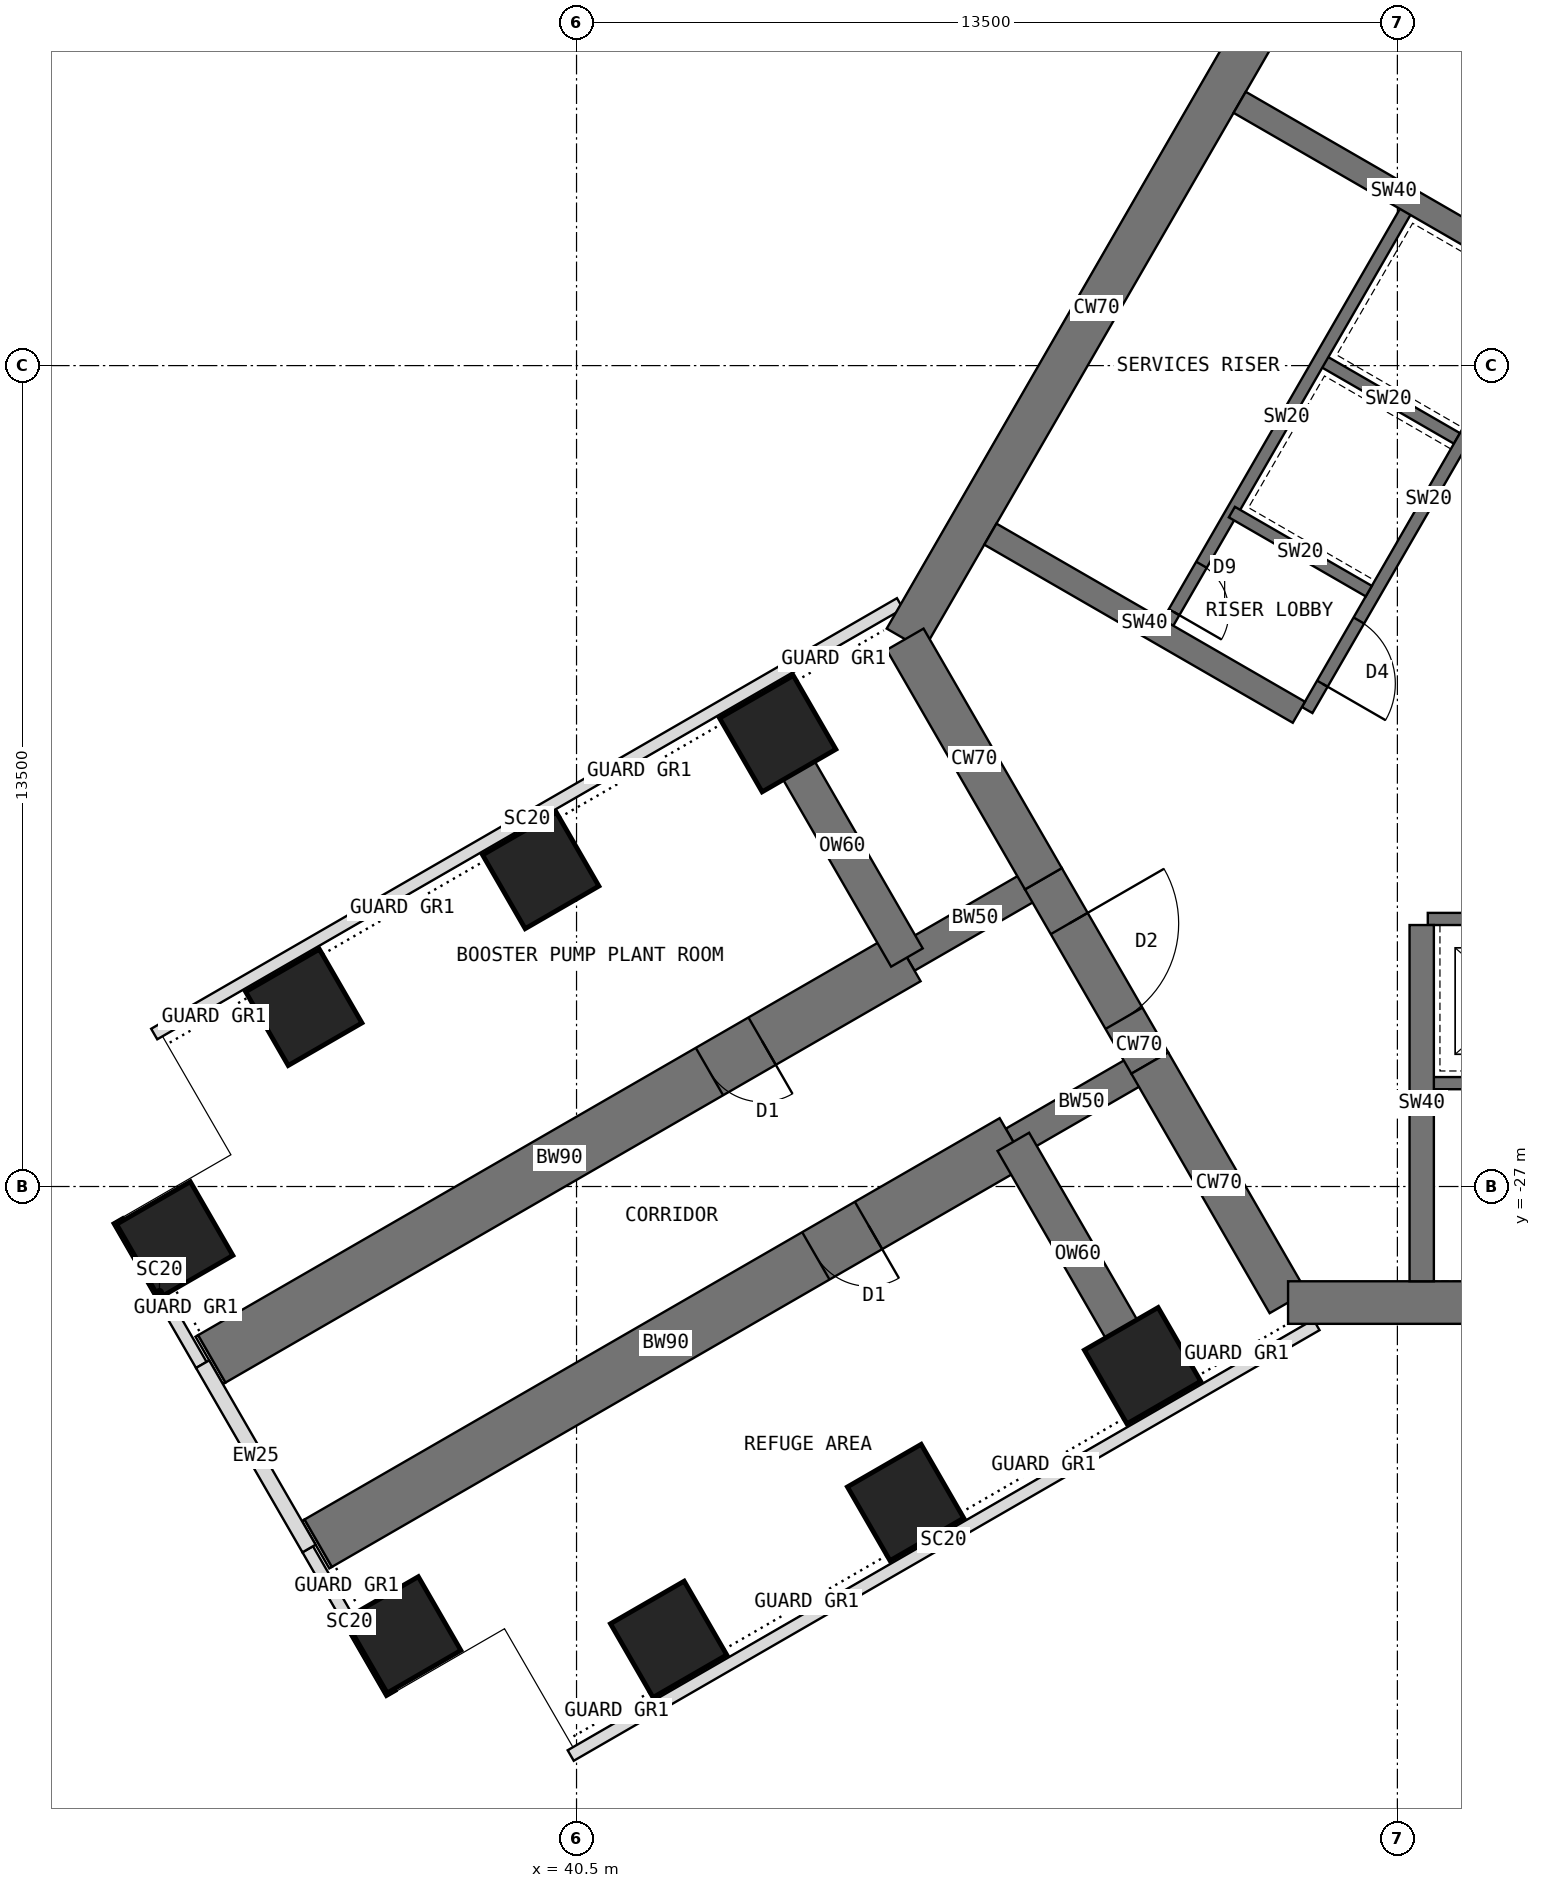
"""IFC4 building model, lengths in metres.
Left out: names, types, materials, properties, quantities, classifications, styles, units other than length and angle.
Written with IfcOpenShell. Run it as: python <this file> out.ifc"""

import sys

from ifc_helpers import new_model, si_unit, direction, frame, frame_2d, origin, origin_2d, place, context, subcontext, project, spatial, rectangle, extrude, element, fill, save


model = new_model("IFC4")
c1 = context("Model", 3, precision=1e-05, world=origin(), true_north=direction((0.0, 1.0)))
c2 = subcontext(c1, "Body", "Model", "MODEL_VIEW")
j1 = project(units=[si_unit("LENGTHUNIT", "METRE"), si_unit("PLANEANGLEUNIT", "RADIAN")], contexts=[c1])
p1 = place(None, origin())
s1 = spatial("IfcSite", under=j1, at=p1, CompositionType="ELEMENT")
p2 = place(p1, origin())
s2 = spatial("IfcBuilding", under=s1, at=p2, CompositionType="ELEMENT")
p3 = place(p2, frame((0.0, 0.0, 92.5)))
s3 = spatial("IfcBuildingStorey", under=s2, at=p3, CompositionType="ELEMENT", Elevation=92.5)
p4 = place(p3, frame((52.202, -7.092, 0.0), z_axis=(0.0, 0.0, 1.0), x_axis=(-0.500005998175, -0.866021940709, 0.0)))
e1 = element("IfcWall", 1, at=p4, inside=s3, PredefinedType="SHEAR", context=c2, shape_type="SweptSolid", body=[
    extrude(rectangle(XDim=12.596, YDim=0.7, at=frame_2d((6.298, 0.0))), origin(), (0.0, 0.0, 1.0), 5.0),
])
p5 = place(p3, frame((45.904, -18.0, 0.0), z_axis=(0.0, 0.0, 1.0), x_axis=(0.500024481964, -0.866011268655, 0.0)))
e2 = element("IfcWall", 2, at=p5, inside=s3, PredefinedType="SHEAR", context=c2, shape_type="SweptSolid", body=[
    extrude(rectangle(XDim=4.548, YDim=0.7, at=frame_2d((2.274, 0.0))), origin(), (0.0, 0.0, 1.0), 5.0),
])
p6 = place(p3, frame((48.178, -21.939, 0.0), z_axis=(0.0, 0.0, 1.0), x_axis=(0.500010275428, -0.866019471182, 0.0)))
e3 = element("IfcWall", 3, at=p6, inside=s3, PredefinedType="SHEAR", context=c2, shape_type="SweptSolid", body=[
    extrude(rectangle(XDim=3.5, YDim=0.7, at=frame_2d((1.75, 0.0))), origin(), (0.0, 0.0, 1.0), 5.0),
])
p7 = place(p6, frame((0.85, 0.0, 0.0)))
e4 = element("IfcOpeningElement", 4, at=p7, cuts=e3, PredefinedType="OPENING", context=c2, shape_type="SweptSolid", body=[
    extrude(rectangle(XDim=1.8, YDim=2.1, at=frame_2d((0.9, 1.05))), frame((0.0, 0.36, 0.0), z_axis=(0.0, -1.0, 0.0), x_axis=(1.0, 0.0, 0.0)), (0.0, 0.0, 1.0), 0.72),
])
p8 = place(p3, frame((49.928, -24.97, 0.0), z_axis=(0.0, 0.0, 1.0), x_axis=(0.499984222037, -0.866034513004, 0.0)))
e5 = element("IfcWall", 5, at=p8, inside=s3, PredefinedType="SHEAR", context=c2, shape_type="SweptSolid", body=[
    extrude(rectangle(XDim=4.548, YDim=0.7, at=frame_2d((2.274, 0.0))), origin(), (0.0, 0.0, 1.0), 5.0),
])
p9 = place(p3, frame((52.202, -28.908, 0.0), z_axis=(0.0, 0.0, 1.0), x_axis=(1.0, 0.0, 0.0)))
e6 = element("IfcWall", 6, at=p9, inside=s3, PredefinedType="SHEAR", context=c2, shape_type="SweptSolid", body=[
    extrude(rectangle(XDim=12.596, YDim=0.7, at=frame_2d((6.298, 0.0))), origin(), (0.0, 0.0, 1.0), 5.0),
])
p10 = place(p3, frame((49.928, -24.97, 0.0), z_axis=(0.0, 0.0, 1.0), x_axis=(-0.866031863473, -0.499988811324, 0.0)))
e7 = element("IfcWall", 7, at=p10, inside=s3, PredefinedType="SHEAR", context=c2, shape_type="SweptSolid", body=[
    extrude(rectangle(XDim=2.592, YDim=0.5, at=frame_2d((1.296, 0.0))), origin(), (0.0, 0.0, 1.0), 5.0),
])
p11 = place(p3, frame((47.684, -26.266, 0.0), z_axis=(0.0, 0.0, 1.0), x_axis=(-0.866027579429, -0.499996231654, 0.0)))
e8 = element("IfcWall", 8, at=p11, inside=s3, PredefinedType="SHEAR", context=c2, shape_type="SweptSolid", body=[
    extrude(rectangle(XDim=13.2, YDim=0.9, at=frame_2d((6.6, 0.0))), origin(), (0.0, 0.0, 1.0), 5.0),
])
p12 = place(p11, frame((2.75, 0.0, 0.0)))
e9 = element("IfcOpeningElement", 9, at=p12, cuts=e8, PredefinedType="OPENING", context=c2, shape_type="SweptSolid", body=[
    extrude(rectangle(XDim=1.0, YDim=2.1, at=frame_2d((0.5, 1.05))), frame((0.0, 0.46, 0.0), z_axis=(0.0, -1.0, 0.0), x_axis=(1.0, 0.0, 0.0)), (0.0, 0.0, 1.0), 0.92),
])
p13 = place(p3, frame((48.178, -21.939, 0.0), z_axis=(0.0, 0.0, 1.0), x_axis=(-0.866072649678, -0.499918158782, 0.0)))
e10 = element("IfcWall", 10, at=p13, inside=s3, PredefinedType="SHEAR", context=c2, shape_type="SweptSolid", body=[
    extrude(rectangle(XDim=2.592, YDim=0.5, at=frame_2d((1.296, 0.0))), origin(), (0.0, 0.0, 1.0), 5.0),
])
p14 = place(p3, frame((45.934, -23.234, 0.0), z_axis=(0.0, 0.0, 1.0), x_axis=(-0.866019570528, -0.500010103361, 0.0)))
e11 = element("IfcWall", 11, at=p14, inside=s3, PredefinedType="SHEAR", context=c2, shape_type="SweptSolid", body=[
    extrude(rectangle(XDim=13.2, YDim=0.9, at=frame_2d((6.6, 0.0))), origin(), (0.0, 0.0, 1.0), 5.0),
])
p15 = place(p14, frame((2.75, 0.0, 0.0)))
e12 = element("IfcOpeningElement", 12, at=p15, cuts=e11, PredefinedType="OPENING", context=c2, shape_type="SweptSolid", body=[
    extrude(rectangle(XDim=1.0, YDim=2.1, at=frame_2d((0.5, 1.05))), frame((0.0, 0.46, 0.0), z_axis=(0.0, -1.0, 0.0), x_axis=(1.0, 0.0, 0.0)), (0.0, 0.0, 1.0), 0.92),
])
for number, where, z_axis, x_axis in (
    (13, (49.809, -29.946, 0.0), (0.0, 0.0, 1.0), (0.866, 0.5, 0.0)),
    (14, (43.809, -19.554, 0.0), (0.0, 0.0, 1.0), (0.866, 0.5, 0.0)),
    (15, (45.912, -32.196, 0.0), (0.0, 0.0, 1.0), (0.866, 0.5, 0.0)),
    (16, (39.912, -21.804, 0.0), (0.0, 0.0, 1.0), (0.866, 0.5, 0.0)),
    (17, (42.014, -34.446, 0.0), (0.0, 0.0, 1.0), (0.866, 0.5, 0.0)),
    (18, (36.014, -24.054, 0.0), (0.0, 0.0, 1.0), (0.866, 0.5, 0.0)),
    (19, (37.642, -34.373, 0.0), (0.0, 0.0, 1.0), (0.866, 0.5, 0.0)),
    (20, (33.892, -27.877, 0.0), (0.0, 0.0, 1.0), (0.866, 0.5, 0.0)),
):
    element("IfcColumn", number, at=place(p3, frame(where, z_axis=z_axis, x_axis=x_axis)), inside=s3, PredefinedType="COLUMN", context=c2, shape_type="SweptSolid", body=[
        extrude(rectangle(XDim=1.4, YDim=1.4, at=origin_2d()), origin(), (0.0, 0.0, 1.0), 5.0),
    ])
for number, where, z_axis, x_axis in (
    (21, (47.684, -26.266, 0.0), (0.0, 0.0, 1.0), (0.5, -0.866, 0.0)),
    (22, (45.934, -23.234, 0.0), (0.0, 0.0, 1.0), (-0.5, 0.866, 0.0)),
):
    element("IfcWall", number, at=place(p3, frame(where, z_axis=z_axis, x_axis=x_axis)), inside=s3, PredefinedType="SHEAR", context=c2, shape_type="SweptSolid", body=[
        extrude(rectangle(XDim=4.25, YDim=0.6, at=frame_2d((2.125, 0.0))), origin(), (0.0, 0.0, 1.0), 5.0),
    ])
for number, where, z_axis, x_axis in (
    (23, (52.67, -29.276, 0.0), (0.0, 0.0, 1.0), (-0.866, -0.5, 0.0)),
    (24, (33.554, -24.493, 0.0), (0.0, 0.0, 1.0), (0.866, 0.5, 0.0)),
):
    element("IfcWall", number, at=place(p3, frame(where, z_axis=z_axis, x_axis=x_axis)), inside=s3, PredefinedType="USERDEFINED", context=c2, shape_type="SweptSolid", body=[
        extrude(rectangle(XDim=14.163, YDim=0.2, at=frame_2d((7.082, 0.0))), origin(), (0.0, 0.0, 1.0), 4.8),
    ])
p16 = place(p3, frame((32.954, -27.553, 0.0), z_axis=(0.0, 0.0, 1.0), x_axis=(0.499996545922, -0.866027397988, 0.0)))
e25 = element("IfcWall", 25, at=p16, inside=s3, PredefinedType="USERDEFINED", context=c2, shape_type="SweptSolid", body=[
    extrude(rectangle(XDim=2.75, YDim=0.2, at=frame_2d((1.375, 0.0))), origin(), (0.0, 0.0, 1.0), 4.8),
])
p17 = place(p3, frame((34.351, -29.922, 0.0), z_axis=(0.0, 0.0, 1.0), x_axis=(0.499980071345, -0.866036909293, 0.0)))
e26 = element("IfcWall", 26, at=p17, inside=s3, PredefinedType="STANDARD", context=c2, shape_type="SweptSolid", body=[
    extrude(rectangle(XDim=3.5, YDim=0.25, at=frame_2d((1.75, 0.0))), origin(), (0.0, 0.0, 1.0), 4.8),
])
p18 = place(p3, frame((36.079, -32.966, 0.0), z_axis=(0.0, 0.0, 1.0), x_axis=(0.499996545922, -0.866027397988, 0.0)))
e27 = element("IfcWall", 27, at=p18, inside=s3, PredefinedType="USERDEFINED", context=c2, shape_type="SweptSolid", body=[
    extrude(rectangle(XDim=2.75, YDim=0.2, at=frame_2d((1.375, 0.0))), origin(), (0.0, 0.0, 1.0), 4.8),
])
p19 = place(p3, frame((36.252, -32.865, 0.0), z_axis=(0.0, 0.0, 1.0), x_axis=(-0.86553723574, -0.500844580232, 0.0)))
e28 = element("IfcWall", 28, at=p19, inside=s3, PredefinedType="PARTITIONING", context=c2, shape_type="SweptSolid", body=[
    extrude(rectangle(XDim=0.05, YDim=0.9, at=frame_2d((0.025, 0.0))), origin(), (0.0, 0.0, 1.0), 4.8),
])
p20 = place(p3, frame((34.502, -29.834, 0.0), z_axis=(0.0, 0.0, 1.0), x_axis=(-0.867642581652, -0.497188445666, 0.0)))
e29 = element("IfcWall", 29, at=p20, inside=s3, PredefinedType="PARTITIONING", context=c2, shape_type="SweptSolid", body=[
    extrude(rectangle(XDim=0.05, YDim=0.9, at=frame_2d((0.025, 0.0))), origin(), (0.0, 0.0, 1.0), 4.8),
])
p21 = place(p3, frame((56.516, -12.236, 0.0), z_axis=(0.0, 0.0, 1.0), x_axis=(-0.49999894854, -0.866026010844, 0.0)))
e30 = element("IfcWall", 30, at=p21, inside=s3, PredefinedType="SHEAR", context=c2, shape_type="SweptSolid", body=[
    extrude(rectangle(XDim=8.0, YDim=0.2, at=frame_2d((4.0, 0.0))), origin(), (0.0, 0.0, 1.0), 5.0),
])
p22 = place(p21, frame((6.3, 0.0, 0.0)))
e31 = element("IfcOpeningElement", 31, at=p22, cuts=e30, PredefinedType="OPENING", context=c2, shape_type="SweptSolid", body=[
    extrude(rectangle(XDim=1.2, YDim=2.1, at=frame_2d((0.6, 1.05))), frame((0.0, 0.11, 0.0), z_axis=(0.0, -1.0, 0.0), x_axis=(1.0, 0.0, 0.0)), (0.0, 0.0, 1.0), 0.22),
])
for number, where, z_axis, x_axis in (
    (32, (54.98, -14.697, 0.0), (0.0, 0.0, 1.0), (-0.866, 0.5, 0.0)),
    (33, (53.53, -17.209, 0.0), (0.0, 0.0, 1.0), (-0.866, 0.5, 0.0)),
):
    element("IfcWall", number, at=place(p3, frame(where, z_axis=z_axis, x_axis=x_axis)), inside=s3, PredefinedType="SHEAR", context=c2, shape_type="SweptSolid", body=[
        extrude(rectangle(XDim=2.6, YDim=0.2, at=frame_2d((1.3, 0.0))), origin(), (0.0, 0.0, 1.0), 5.0),
    ])
p23 = place(p3, frame((54.178, -10.886, 0.0), z_axis=(0.0, 0.0, 1.0), x_axis=(-0.49999894854, -0.866026010844, 0.0)))
e34 = element("IfcWall", 34, at=p23, inside=s3, PredefinedType="SHEAR", context=c2, shape_type="SweptSolid", body=[
    extrude(rectangle(XDim=8.0, YDim=0.2, at=frame_2d((4.0, 0.0))), origin(), (0.0, 0.0, 1.0), 5.0),
])
p24 = place(p23, frame((6.8, 0.0, 0.0)))
e35 = element("IfcOpeningElement", 35, at=p24, cuts=e34, PredefinedType="OPENING", context=c2, shape_type="SweptSolid", body=[
    extrude(rectangle(XDim=0.9, YDim=2.1, at=frame_2d((0.45, 1.05))), frame((0.0, 0.11, 0.0), z_axis=(0.0, -1.0, 0.0), x_axis=(1.0, 0.0, 0.0)), (0.0, 0.0, 1.0), 0.22),
])
for number, where, z_axis, x_axis in (
    (36, (52.38, -19.201, 0.0), (0.0, 0.0, 1.0), (-0.866, 0.5, 0.0)),
    (37, (56.48, -12.099, 0.0), (0.0, 0.0, 1.0), (-0.866, 0.5, 0.0)),
):
    element("IfcWall", number, at=place(p3, frame(where, z_axis=z_axis, x_axis=x_axis)), inside=s3, PredefinedType="SHEAR", context=c2, shape_type="SweptSolid", body=[
        extrude(rectangle(XDim=5.858, YDim=0.4, at=frame_2d((2.929, 0.0))), origin(), (0.0, 0.0, 1.0), 5.0),
    ])
p25 = place(p3, frame((54.5, -22.6, 0.0), z_axis=(0.0, 0.0, 1.0), x_axis=(1.0, 0.0, 0.0)))
e38 = element("IfcWall", 38, at=p25, inside=s3, PredefinedType="SHEAR", context=c2, shape_type="SweptSolid", body=[
    extrude(rectangle(XDim=8.0, YDim=0.2, at=frame_2d((4.0, 0.0))), origin(), (0.0, 0.0, 1.0), 5.0),
])
p26 = place(p25, frame((6.3, 0.0, 0.0)))
e39 = element("IfcOpeningElement", 39, at=p26, cuts=e38, PredefinedType="OPENING", context=c2, shape_type="SweptSolid", body=[
    extrude(rectangle(XDim=1.2, YDim=2.1, at=frame_2d((0.6, 1.05))), frame((0.0, 0.11, 0.0), z_axis=(0.0, -1.0, 0.0), x_axis=(1.0, 0.0, 0.0)), (0.0, 0.0, 1.0), 0.22),
])
p27 = place(p25, frame((0.9, 0.0, 0.0)))
e40 = element("IfcOpeningElement", 40, at=p27, cuts=e38, PredefinedType="OPENING", context=c2, shape_type="SweptSolid", body=[
    extrude(rectangle(XDim=1.1, YDim=2.2, at=frame_2d((0.55, 1.1))), frame((0.0, 0.11, 0.0), z_axis=(0.0, -1.0, 0.0), x_axis=(1.0, 0.0, 0.0)), (0.0, 0.0, 1.0), 0.22),
])
p28 = place(p3, frame((54.5, -25.3, 0.0), z_axis=(0.0, 0.0, 1.0), x_axis=(1.0, 0.0, 0.0)))
e41 = element("IfcWall", 41, at=p28, inside=s3, PredefinedType="SHEAR", context=c2, shape_type="SweptSolid", body=[
    extrude(rectangle(XDim=8.0, YDim=0.2, at=frame_2d((4.0, 0.0))), origin(), (0.0, 0.0, 1.0), 5.0),
])
p29 = place(p28, frame((6.7, 0.0, 0.0)))
e42 = element("IfcOpeningElement", 42, at=p29, cuts=e41, PredefinedType="OPENING", context=c2, shape_type="SweptSolid", body=[
    extrude(rectangle(XDim=1.1, YDim=2.1, at=frame_2d((0.55, 1.05))), frame((0.0, 0.11, 0.0), z_axis=(0.0, -1.0, 0.0), x_axis=(1.0, 0.0, 0.0)), (0.0, 0.0, 1.0), 0.22),
])
p30 = place(p3, frame((54.4, -22.7, 0.0), z_axis=(0.0, 0.0, 1.0), x_axis=(0.0, -1.0, 0.0)))
e43 = element("IfcWall", 43, at=p30, inside=s3, PredefinedType="SHEAR", context=c2, shape_type="SweptSolid", body=[
    extrude(rectangle(XDim=5.858, YDim=0.4, at=frame_2d((2.929, 0.0))), origin(), (0.0, 0.0, 1.0), 5.0),
])
p31 = place(p22, origin())
e44 = element("IfcDoor", 44, at=p31, inside=s3, OperationType="SINGLE_SWING_RIGHT", PredefinedType="DOOR", context=c2, shape_type="SweptSolid", body=[
    extrude(rectangle(XDim=1.2, YDim=2.1, at=frame_2d((0.6, 1.05))), frame((0.0, 0.025, 0.0), z_axis=(0.0, -1.0, 0.0), x_axis=(1.0, 0.0, 0.0)), (0.0, 0.0, 1.0), 0.05),
])
fill(e31, e44)
p32 = place(p24, origin())
e45 = element("IfcDoor", 45, at=p32, inside=s3, OperationType="SINGLE_SWING_RIGHT", PredefinedType="DOOR", context=c2, shape_type="SweptSolid", body=[
    extrude(rectangle(XDim=0.9, YDim=2.1, at=frame_2d((0.45, 1.05))), frame((0.0, 0.025, 0.0), z_axis=(0.0, -1.0, 0.0), x_axis=(1.0, 0.0, 0.0)), (0.0, 0.0, 1.0), 0.05),
])
fill(e35, e45)
p33 = place(p7, origin())
e46 = element("IfcDoor", 46, at=p33, inside=s3, OperationType="DOUBLE_DOOR_DOUBLE_SWING", PredefinedType="DOOR", context=c2, shape_type="SweptSolid", body=[
    extrude(rectangle(XDim=1.72, YDim=2.06, at=frame_2d((0.9, 1.03))), frame((0.0, 0.025, 0.0), z_axis=(0.0, -1.0, 0.0), x_axis=(1.0, 0.0, 0.0)), (0.0, 0.0, 1.0), 0.05),
    extrude(rectangle(XDim=0.04, YDim=2.1, at=frame_2d((0.02, 1.05))), frame((0.0, 0.35, 0.0), z_axis=(0.0, -1.0, 0.0), x_axis=(1.0, 0.0, 0.0)), (0.0, 0.0, 1.0), 0.699),
    extrude(rectangle(XDim=0.04, YDim=2.1, at=frame_2d((1.78, 1.05))), frame((0.0, 0.35, 0.0), z_axis=(0.0, -1.0, 0.0), x_axis=(1.0, 0.0, 0.0)), (0.0, 0.0, 1.0), 0.699),
    extrude(rectangle(XDim=1.72, YDim=0.04, at=frame_2d((0.9, 2.08))), frame((0.0, 0.35, 0.0), z_axis=(0.0, -1.0, 0.0), x_axis=(1.0, 0.0, 0.0)), (0.0, 0.0, 1.0), 0.699),
])
fill(e4, e46)
p34 = place(p12, origin())
e47 = element("IfcDoor", 47, at=p34, inside=s3, OperationType="SINGLE_SWING_LEFT", PredefinedType="DOOR", context=c2, shape_type="SweptSolid", body=[
    extrude(rectangle(XDim=0.92, YDim=2.06, at=frame_2d((0.5, 1.03))), frame((0.0, 0.025, 0.0), z_axis=(0.0, -1.0, 0.0), x_axis=(1.0, 0.0, 0.0)), (0.0, 0.0, 1.0), 0.05),
    extrude(rectangle(XDim=0.04, YDim=2.1, at=frame_2d((0.02, 1.05))), frame((0.0, 0.45, 0.0), z_axis=(0.0, -1.0, 0.0), x_axis=(1.0, 0.0, 0.0)), (0.0, 0.0, 1.0), 0.899),
    extrude(rectangle(XDim=0.04, YDim=2.1, at=frame_2d((0.98, 1.05))), frame((0.0, 0.45, 0.0), z_axis=(0.0, -1.0, 0.0), x_axis=(1.0, 0.0, 0.0)), (0.0, 0.0, 1.0), 0.899),
    extrude(rectangle(XDim=0.92, YDim=0.04, at=frame_2d((0.5, 2.08))), frame((0.0, 0.45, 0.0), z_axis=(0.0, -1.0, 0.0), x_axis=(1.0, 0.0, 0.0)), (0.0, 0.0, 1.0), 0.899),
])
fill(e9, e47)
p35 = place(p15, origin())
e48 = element("IfcDoor", 48, at=p35, inside=s3, OperationType="SINGLE_SWING_LEFT", PredefinedType="DOOR", context=c2, shape_type="SweptSolid", body=[
    extrude(rectangle(XDim=0.92, YDim=2.06, at=frame_2d((0.5, 1.03))), frame((0.0, 0.025, 0.0), z_axis=(0.0, -1.0, 0.0), x_axis=(1.0, 0.0, 0.0)), (0.0, 0.0, 1.0), 0.05),
    extrude(rectangle(XDim=0.04, YDim=2.1, at=frame_2d((0.02, 1.05))), frame((0.0, 0.45, 0.0), z_axis=(0.0, -1.0, 0.0), x_axis=(1.0, 0.0, 0.0)), (0.0, 0.0, 1.0), 0.899),
    extrude(rectangle(XDim=0.04, YDim=2.1, at=frame_2d((0.98, 1.05))), frame((0.0, 0.45, 0.0), z_axis=(0.0, -1.0, 0.0), x_axis=(1.0, 0.0, 0.0)), (0.0, 0.0, 1.0), 0.899),
    extrude(rectangle(XDim=0.92, YDim=0.04, at=frame_2d((0.5, 2.08))), frame((0.0, 0.45, 0.0), z_axis=(0.0, -1.0, 0.0), x_axis=(1.0, 0.0, 0.0)), (0.0, 0.0, 1.0), 0.899),
])
fill(e12, e48)
save(model, sys.argv[1])
